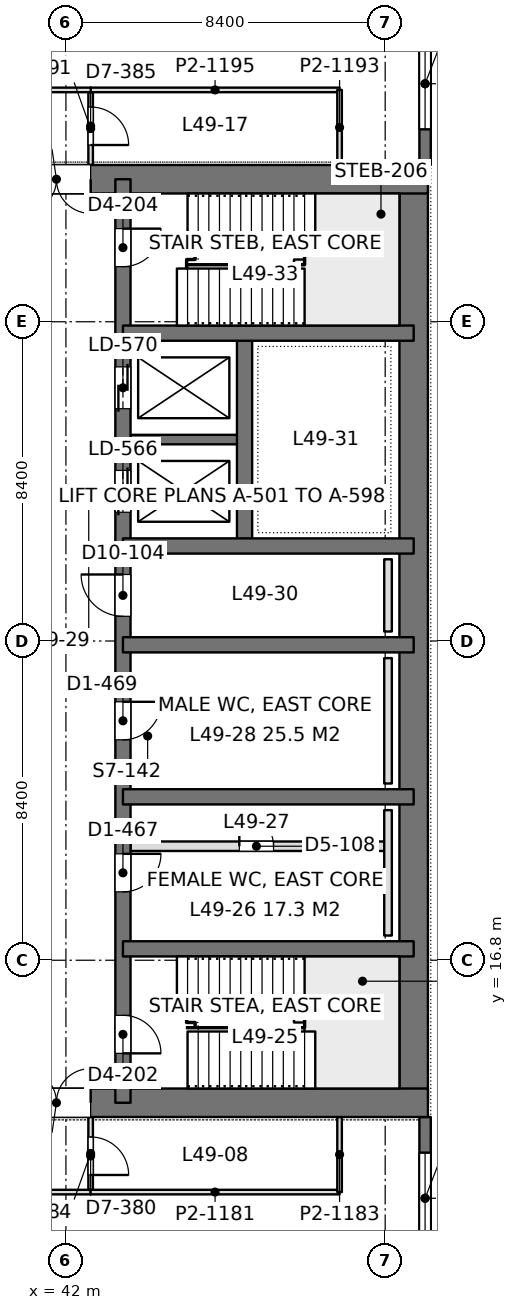
"""IFC4 building model, lengths in metres.
Left out: names, types, materials, properties, quantities, classifications, styles, units other than length and angle.
Written with IfcOpenShell. Run it as: python <this file> out.ifc"""

import sys

from ifc_helpers import new_model, si_unit, direction, frame, frame_2d, origin, place, context, subcontext, project, spatial, rectangle, extrude, element, fill, save


model = new_model("IFC4")
c1 = context("Model", 3, precision=1e-05, world=origin(), true_north=direction((0.0, 1.0)))
c2 = subcontext(c1, "Body", "Model", "MODEL_VIEW")
j1 = project(units=[si_unit("LENGTHUNIT", "METRE"), si_unit("PLANEANGLEUNIT", "RADIAN")], contexts=[c1])
p1 = place(None, origin())
s1 = spatial("IfcSite", under=j1, at=p1, CompositionType="ELEMENT")
p2 = place(p1, origin())
s2 = spatial("IfcBuilding", under=s1, at=p2, CompositionType="ELEMENT")
p3 = place(p2, frame((0.0, 0.0, 215.4)))
s3 = spatial("IfcBuildingStorey", under=s2, at=p3, CompositionType="ELEMENT", Elevation=215.4)
p4 = place(p3, frame((33.675, 13.05, 0.0), z_axis=(0.0, 0.0, 1.0), x_axis=(1.0, 0.0, 0.0)))
e1 = element("IfcWall", 1, at=p4, inside=s3, PredefinedType="SHEAR", context=c2, shape_type="SweptSolid", body=[
    extrude(rectangle(XDim=17.85, YDim=0.75, at=frame_2d((8.925, 0.0))), origin(), (0.0, 0.0, 1.0), 4.2),
])
p5 = place(p4, frame((7.175, 0.0, 0.0)))
e2 = element("IfcOpeningElement", 2, at=p5, cuts=e1, PredefinedType="OPENING", context=c2, shape_type="SweptSolid", body=[
    extrude(rectangle(XDim=1.8, YDim=2.4, at=frame_2d((0.9, 1.2))), frame((0.0, 0.385, 0.0), z_axis=(0.0, -1.0, 0.0), x_axis=(1.0, 0.0, 0.0)), (0.0, 0.0, 1.0), 0.77),
])
p6 = place(p3, frame((33.675, 37.35, 0.0), z_axis=(0.0, 0.0, 1.0), x_axis=(1.0, 0.0, 0.0)))
e3 = element("IfcWall", 3, at=p6, inside=s3, PredefinedType="SHEAR", context=c2, shape_type="SweptSolid", body=[
    extrude(rectangle(XDim=17.85, YDim=0.75, at=frame_2d((8.925, 0.0))), origin(), (0.0, 0.0, 1.0), 4.2),
])
p7 = place(p6, frame((7.175, 0.0, 0.0)))
e4 = element("IfcOpeningElement", 4, at=p7, cuts=e3, PredefinedType="OPENING", context=c2, shape_type="SweptSolid", body=[
    extrude(rectangle(XDim=1.8, YDim=2.4, at=frame_2d((0.9, 1.2))), frame((0.0, 0.385, 0.0), z_axis=(0.0, -1.0, 0.0), x_axis=(1.0, 0.0, 0.0)), (0.0, 0.0, 1.0), 0.77),
])
p8 = place(p3, frame((51.15, 13.05, 0.0), z_axis=(0.0, 0.0, 1.0), x_axis=(0.0, 1.0, 0.0)))
e5 = element("IfcWall", 5, at=p8, inside=s3, PredefinedType="SHEAR", context=c2, shape_type="SweptSolid", body=[
    extrude(rectangle(XDim=24.3, YDim=0.75, at=frame_2d((12.15, 0.0))), origin(), (0.0, 0.0, 1.0), 4.2),
])
p9 = place(p3, frame((43.5, 13.05, 0.0), z_axis=(0.0, 0.0, 1.0), x_axis=(0.0, 1.0, 0.0)))
e6 = element("IfcWall", 6, at=p9, inside=s3, PredefinedType="SHEAR", context=c2, shape_type="SweptSolid", body=[
    extrude(rectangle(XDim=24.3, YDim=0.4, at=frame_2d((12.15, 0.0))), origin(), (0.0, 0.0, 1.0), 4.2),
])
p10 = place(p9, frame((1.3, 0.0, 0.0)))
e7 = element("IfcOpeningElement", 7, at=p10, cuts=e6, PredefinedType="OPENING", context=c2, shape_type="SweptSolid", body=[
    extrude(rectangle(XDim=1.0, YDim=2.2, at=frame_2d((0.5, 1.1))), frame((0.0, 0.21, 0.0), z_axis=(0.0, -1.0, 0.0), x_axis=(1.0, 0.0, 0.0)), (0.0, 0.0, 1.0), 0.42),
])
p11 = place(p9, frame((22.0, 0.0, 0.0)))
e8 = element("IfcOpeningElement", 8, at=p11, cuts=e6, PredefinedType="OPENING", context=c2, shape_type="SweptSolid", body=[
    extrude(rectangle(XDim=1.0, YDim=2.2, at=frame_2d((0.5, 1.1))), frame((0.0, 0.21, 0.0), z_axis=(0.0, -1.0, 0.0), x_axis=(1.0, 0.0, 0.0)), (0.0, 0.0, 1.0), 0.42),
])
p12 = place(p9, frame((5.55, 0.0, 0.0)))
e9 = element("IfcOpeningElement", 9, at=p12, cuts=e6, PredefinedType="OPENING", context=c2, shape_type="SweptSolid", body=[
    extrude(rectangle(XDim=1.0, YDim=2.2, at=frame_2d((0.5, 1.1))), frame((0.0, 0.21, 0.0), z_axis=(0.0, -1.0, 0.0), x_axis=(1.0, 0.0, 0.0)), (0.0, 0.0, 1.0), 0.42),
])
p13 = place(p9, frame((9.55, 0.0, 0.0)))
e10 = element("IfcOpeningElement", 10, at=p13, cuts=e6, PredefinedType="OPENING", context=c2, shape_type="SweptSolid", body=[
    extrude(rectangle(XDim=1.0, YDim=2.2, at=frame_2d((0.5, 1.1))), frame((0.0, 0.21, 0.0), z_axis=(0.0, -1.0, 0.0), x_axis=(1.0, 0.0, 0.0)), (0.0, 0.0, 1.0), 0.42),
])
p14 = place(p9, frame((12.8, 0.0, 0.0)))
e11 = element("IfcOpeningElement", 11, at=p14, cuts=e6, PredefinedType="OPENING", context=c2, shape_type="SweptSolid", body=[
    extrude(rectangle(XDim=1.1, YDim=2.2, at=frame_2d((0.55, 1.1))), frame((0.0, 0.21, 0.0), z_axis=(0.0, -1.0, 0.0), x_axis=(1.0, 0.0, 0.0)), (0.0, 0.0, 1.0), 0.42),
])
p15 = place(p9, frame((15.538, 0.0, 0.0)))
e12 = element("IfcOpeningElement", 12, at=p15, cuts=e6, PredefinedType="OPENING", context=c2, shape_type="SweptSolid", body=[
    extrude(rectangle(XDim=1.1, YDim=2.2, at=frame_2d((0.55, 1.1))), frame((0.0, 0.21, 0.0), z_axis=(0.0, -1.0, 0.0), x_axis=(1.0, 0.0, 0.0)), (0.0, 0.0, 1.0), 0.42),
])
p16 = place(p9, frame((18.262, 0.0, 0.0)))
e13 = element("IfcOpeningElement", 13, at=p16, cuts=e6, PredefinedType="OPENING", context=c2, shape_type="SweptSolid", body=[
    extrude(rectangle(XDim=1.1, YDim=2.2, at=frame_2d((0.55, 1.1))), frame((0.0, 0.21, 0.0), z_axis=(0.0, -1.0, 0.0), x_axis=(1.0, 0.0, 0.0)), (0.0, 0.0, 1.0), 0.42),
])
for number, where, z_axis, x_axis in (
    (14, (51.15, 17.1, 0.0), (0.0, 0.0, 1.0), (-1.0, 0.0, 0.0)),
    (15, (51.15, 21.1, 0.0), (0.0, 0.0, 1.0), (-1.0, 0.0, 0.0)),
    (16, (51.15, 25.1, 0.0), (0.0, 0.0, 1.0), (-1.0, 0.0, 0.0)),
    (17, (51.15, 27.7, 0.0), (0.0, 0.0, 1.0), (-1.0, 0.0, 0.0)),
    (18, (51.15, 33.3, 0.0), (0.0, 0.0, 1.0), (-1.0, 0.0, 0.0)),
):
    element("IfcWall", number, at=place(p3, frame(where, z_axis=z_axis, x_axis=x_axis)), inside=s3, PredefinedType="SHEAR", context=c2, shape_type="SweptSolid", body=[
        extrude(rectangle(XDim=7.65, YDim=0.4, at=frame_2d((3.825, 0.0))), origin(), (0.0, 0.0, 1.0), 4.2),
    ])
p17 = place(p3, frame((46.7, 27.7, 0.0), z_axis=(0.0, 0.0, 1.0), x_axis=(0.0, 1.0, 0.0)))
e19 = element("IfcWall", 19, at=p17, inside=s3, PredefinedType="SHEAR", context=c2, shape_type="SweptSolid", body=[
    extrude(rectangle(XDim=5.6, YDim=0.4, at=frame_2d((2.8, 0.0))), origin(), (0.0, 0.0, 1.0), 4.2),
])
p18 = place(p3, frame((46.7, 30.5, 0.0), z_axis=(0.0, 0.0, 1.0), x_axis=(-1.0, 0.0, 0.0)))
e20 = element("IfcWall", 20, at=p18, inside=s3, PredefinedType="SHEAR", context=c2, shape_type="SweptSolid", body=[
    extrude(rectangle(XDim=3.2, YDim=0.25, at=frame_2d((1.6, 0.0))), origin(), (0.0, 0.0, 1.0), 4.2),
])
p19 = place(p3, frame((51.45, 42.0, 0.0), z_axis=(0.0, 0.0, 1.0), x_axis=(0.0, -1.0, 0.0)))
e21 = element("IfcWall", 21, at=p19, inside=s3, PredefinedType="SOLIDWALL", context=c2, shape_type="SweptSolid", body=[
    extrude(rectangle(XDim=4.275, YDim=0.3, at=frame_2d((2.137, 0.0))), origin(), (0.0, 0.0, 1.0), 4.05),
])
p20 = place(p19, frame((0.938, 0.0, 0.9)))
e22 = element("IfcOpeningElement", 22, at=p20, cuts=e21, PredefinedType="OPENING", context=c2, shape_type="SweptSolid", body=[
    extrude(rectangle(XDim=2.4, YDim=1.9, at=frame_2d((1.2, 0.95))), frame((0.0, 0.16, 0.0), z_axis=(0.0, -1.0, 0.0), x_axis=(1.0, 0.0, 0.0)), (0.0, 0.0, 1.0), 0.32),
])
p21 = place(p3, frame((51.45, 12.675, 0.0), z_axis=(0.0, 0.0, 1.0), x_axis=(0.0, -1.0, 0.0)))
e23 = element("IfcWall", 23, at=p21, inside=s3, PredefinedType="SOLIDWALL", context=c2, shape_type="SweptSolid", body=[
    extrude(rectangle(XDim=4.275, YDim=0.3, at=frame_2d((2.138, 0.0))), origin(), (0.0, 0.0, 1.0), 4.05),
])
p22 = place(p21, frame((0.938, 0.0, 0.9)))
e24 = element("IfcOpeningElement", 24, at=p22, cuts=e23, PredefinedType="OPENING", context=c2, shape_type="SweptSolid", body=[
    extrude(rectangle(XDim=2.4, YDim=1.9, at=frame_2d((1.2, 0.95))), frame((0.0, 0.16, 0.0), z_axis=(0.0, -1.0, 0.0), x_axis=(1.0, 0.0, 0.0)), (0.0, 0.0, 1.0), 0.32),
])
p23 = place(p3, frame((1.2, 10.7, 0.0), z_axis=(0.0, 0.0, 1.0), x_axis=(1.0, 0.0, 0.0)))
e25 = element("IfcWall", 25, at=p23, inside=s3, PredefinedType="PARTITIONING", context=c2, shape_type="SweptSolid", body=[
    extrude(rectangle(XDim=41.452, YDim=0.12, at=frame_2d((20.726, 0.0))), origin(), (0.0, 0.0, 1.0), 3.55),
])
p24 = place(p23, frame((4.3, 0.0, 0.0)))
e26 = element("IfcOpeningElement", 26, at=p24, cuts=e25, PredefinedType="OPENING", context=c2, shape_type="SweptSolid", body=[
    extrude(rectangle(XDim=1.8, YDim=2.2, at=frame_2d((0.9, 1.1))), frame((0.0, 0.07, 0.0), z_axis=(0.0, -1.0, 0.0), x_axis=(1.0, 0.0, 0.0)), (0.0, 0.0, 1.0), 0.14),
])
p25 = place(p23, frame((9.5, 0.0, 0.0)))
e27 = element("IfcOpeningElement", 27, at=p25, cuts=e25, PredefinedType="OPENING", context=c2, shape_type="SweptSolid", body=[
    extrude(rectangle(XDim=1.8, YDim=2.2, at=frame_2d((0.9, 1.1))), frame((0.0, 0.07, 0.0), z_axis=(0.0, -1.0, 0.0), x_axis=(1.0, 0.0, 0.0)), (0.0, 0.0, 1.0), 0.14),
])
p26 = place(p23, frame((23.317, 0.0, 0.0)))
e28 = element("IfcOpeningElement", 28, at=p26, cuts=e25, PredefinedType="OPENING", context=c2, shape_type="SweptSolid", body=[
    extrude(rectangle(XDim=1.8, YDim=2.2, at=frame_2d((0.9, 1.1))), frame((0.0, 0.07, 0.0), z_axis=(0.0, -1.0, 0.0), x_axis=(1.0, 0.0, 0.0)), (0.0, 0.0, 1.0), 0.14),
])
p27 = place(p23, frame((31.933, 0.0, 0.0)))
e29 = element("IfcOpeningElement", 29, at=p27, cuts=e25, PredefinedType="OPENING", context=c2, shape_type="SweptSolid", body=[
    extrude(rectangle(XDim=1.8, YDim=2.2, at=frame_2d((0.9, 1.1))), frame((0.0, 0.07, 0.0), z_axis=(0.0, -1.0, 0.0), x_axis=(1.0, 0.0, 0.0)), (0.0, 0.0, 1.0), 0.14),
])
p28 = place(p3, frame((42.65, 10.758, 0.0), z_axis=(0.0, 0.0, 1.0), x_axis=(0.0, 1.0, 0.0)))
e30 = element("IfcWall", 30, at=p28, inside=s3, PredefinedType="PARTITIONING", context=c2, shape_type="SweptSolid", body=[
    extrude(rectangle(XDim=1.918, YDim=0.12, at=frame_2d((0.959, 0.0))), origin(), (0.0, 0.0, 1.0), 4.05),
])
p29 = place(p28, frame((0.392, 0.0, 0.0)))
e31 = element("IfcOpeningElement", 31, at=p29, cuts=e30, PredefinedType="OPENING", context=c2, shape_type="SweptSolid", body=[
    extrude(rectangle(XDim=1.0, YDim=2.4, at=frame_2d((0.5, 1.2))), frame((0.0, 0.07, 0.0), z_axis=(0.0, -1.0, 0.0), x_axis=(1.0, 0.0, 0.0)), (0.0, 0.0, 1.0), 0.14),
])
p30 = place(p3, frame((42.648, 10.7, 0.0), z_axis=(0.0, 0.0, 1.0), x_axis=(1.0, 0.0, 0.0)))
e32 = element("IfcWall", 32, at=p30, inside=s3, PredefinedType="PARTITIONING", context=c2, shape_type="SweptSolid", body=[
    extrude(rectangle(XDim=6.552, YDim=0.12, at=frame_2d((3.276, 0.0))), origin(), (0.0, 0.0, 1.0), 4.05),
])
p31 = place(p3, frame((49.2, 10.7, 0.0), z_axis=(0.0, 0.0, 1.0), x_axis=(0.0, 1.0, 0.0)))
e33 = element("IfcWall", 33, at=p31, inside=s3, PredefinedType="PARTITIONING", context=c2, shape_type="SweptSolid", body=[
    extrude(rectangle(XDim=1.976, YDim=0.12, at=frame_2d((0.988, 0.0))), origin(), (0.0, 0.0, 1.0), 4.05),
])
p32 = place(p3, frame((1.2, 39.7, 0.0), z_axis=(0.0, 0.0, 1.0), x_axis=(1.0, 0.0, 0.0)))
e34 = element("IfcWall", 34, at=p32, inside=s3, PredefinedType="PARTITIONING", context=c2, shape_type="SweptSolid", body=[
    extrude(rectangle(XDim=41.452, YDim=0.12, at=frame_2d((20.726, 0.0))), origin(), (0.0, 0.0, 1.0), 3.55),
])
p33 = place(p32, frame((5.7, 0.0, 0.0)))
e35 = element("IfcOpeningElement", 35, at=p33, cuts=e34, PredefinedType="OPENING", context=c2, shape_type="SweptSolid", body=[
    extrude(rectangle(XDim=1.8, YDim=2.2, at=frame_2d((0.9, 1.1))), frame((0.0, 0.07, 0.0), z_axis=(0.0, -1.0, 0.0), x_axis=(1.0, 0.0, 0.0)), (0.0, 0.0, 1.0), 0.14),
])
p34 = place(p32, frame((12.3, 0.0, 0.0)))
e36 = element("IfcOpeningElement", 36, at=p34, cuts=e34, PredefinedType="OPENING", context=c2, shape_type="SweptSolid", body=[
    extrude(rectangle(XDim=1.8, YDim=2.2, at=frame_2d((0.9, 1.1))), frame((0.0, 0.07, 0.0), z_axis=(0.0, -1.0, 0.0), x_axis=(1.0, 0.0, 0.0)), (0.0, 0.0, 1.0), 0.14),
])
p35 = place(p32, frame((26.117, 0.0, 0.0)))
e37 = element("IfcOpeningElement", 37, at=p35, cuts=e34, PredefinedType="OPENING", context=c2, shape_type="SweptSolid", body=[
    extrude(rectangle(XDim=1.8, YDim=2.2, at=frame_2d((0.9, 1.1))), frame((0.0, 0.07, 0.0), z_axis=(0.0, -1.0, 0.0), x_axis=(1.0, 0.0, 0.0)), (0.0, 0.0, 1.0), 0.14),
])
p36 = place(p32, frame((33.333, 0.0, 0.0)))
e38 = element("IfcOpeningElement", 38, at=p36, cuts=e34, PredefinedType="OPENING", context=c2, shape_type="SweptSolid", body=[
    extrude(rectangle(XDim=1.8, YDim=2.2, at=frame_2d((0.9, 1.1))), frame((0.0, 0.07, 0.0), z_axis=(0.0, -1.0, 0.0), x_axis=(1.0, 0.0, 0.0)), (0.0, 0.0, 1.0), 0.14),
])
p37 = place(p3, frame((42.65, 37.724, 0.0), z_axis=(0.0, 0.0, 1.0), x_axis=(0.0, 1.0, 0.0)))
e39 = element("IfcWall", 39, at=p37, inside=s3, PredefinedType="PARTITIONING", context=c2, shape_type="SweptSolid", body=[
    extrude(rectangle(XDim=1.918, YDim=0.12, at=frame_2d((0.959, 0.0))), origin(), (0.0, 0.0, 1.0), 4.05),
])
p38 = place(p37, frame((0.526, 0.0, 0.0)))
e40 = element("IfcOpeningElement", 40, at=p38, cuts=e39, PredefinedType="OPENING", context=c2, shape_type="SweptSolid", body=[
    extrude(rectangle(XDim=1.0, YDim=2.4, at=frame_2d((0.5, 1.2))), frame((0.0, 0.07, 0.0), z_axis=(0.0, -1.0, 0.0), x_axis=(1.0, 0.0, 0.0)), (0.0, 0.0, 1.0), 0.14),
])
p39 = place(p3, frame((42.648, 39.7, 0.0), z_axis=(0.0, 0.0, 1.0), x_axis=(1.0, 0.0, 0.0)))
e41 = element("IfcWall", 41, at=p39, inside=s3, PredefinedType="PARTITIONING", context=c2, shape_type="SweptSolid", body=[
    extrude(rectangle(XDim=6.552, YDim=0.12, at=frame_2d((3.276, 0.0))), origin(), (0.0, 0.0, 1.0), 3.69),
])
p40 = place(p3, frame((49.2, 37.724, 0.0), z_axis=(0.0, 0.0, 1.0), x_axis=(0.0, 1.0, 0.0)))
e42 = element("IfcWall", 42, at=p40, inside=s3, PredefinedType="PARTITIONING", context=c2, shape_type="SweptSolid", body=[
    extrude(rectangle(XDim=1.976, YDim=0.12, at=frame_2d((0.988, 0.0))), origin(), (0.0, 0.0, 1.0), 4.05),
])
p41 = place(p3, frame((43.7, 19.8, 0.0), z_axis=(0.0, 0.0, 1.0), x_axis=(1.0, 0.0, 0.0)))
e43 = element("IfcWall", 43, at=p41, inside=s3, PredefinedType="PARTITIONING", context=c2, shape_type="SweptSolid", body=[
    extrude(rectangle(XDim=6.675, YDim=0.25, at=frame_2d((3.337, 0.0))), origin(), (0.0, 0.0, 1.0), 4.0),
])
p42 = place(p41, frame((2.863, 0.0, 0.0)))
e44 = element("IfcOpeningElement", 44, at=p42, cuts=e43, PredefinedType="OPENING", context=c2, shape_type="SweptSolid", body=[
    extrude(rectangle(XDim=0.9, YDim=2.2, at=frame_2d((0.45, 1.1))), frame((0.0, 0.135, 0.0), z_axis=(0.0, -1.0, 0.0), x_axis=(1.0, 0.0, 0.0)), (0.0, 0.0, 1.0), 0.27),
])
for number, where, z_axis, x_axis in (
    (45, (50.475, 17.45, 0.0), (0.0, 0.0, 1.0), (0.0, 1.0, 0.0)),
    (46, (50.475, 21.45, 0.0), (0.0, 0.0, 1.0), (0.0, 1.0, 0.0)),
):
    element("IfcWall", number, at=place(p3, frame(where, z_axis=z_axis, x_axis=x_axis)), inside=s3, PredefinedType="PLUMBINGWALL", context=c2, shape_type="SweptSolid", body=[
        extrude(rectangle(XDim=3.3, YDim=0.2, at=frame_2d((1.65, 0.0))), origin(), (0.0, 0.0, 1.0), 1.2),
    ])
p43 = place(p3, frame((50.475, 25.45, 0.0), z_axis=(0.0, 0.0, 1.0), x_axis=(0.0, 1.0, 0.0)))
e47 = element("IfcWall", 47, at=p43, inside=s3, PredefinedType="PLUMBINGWALL", context=c2, shape_type="SweptSolid", body=[
    extrude(rectangle(XDim=1.9, YDim=0.2, at=frame_2d((0.95, 0.0))), origin(), (0.0, 0.0, 1.0), 1.2),
])
p44 = place(p20, origin())
e48 = element("IfcWindow", 48, at=p44, inside=s3, PartitioningType="SINGLE_PANEL", PredefinedType="WINDOW", context=c2, shape_type="SweptSolid", body=[
    extrude(rectangle(XDim=2.4, YDim=1.9, at=frame_2d((1.2, 0.95))), frame((0.0, 0.03, 0.0), z_axis=(0.0, -1.0, 0.0), x_axis=(1.0, 0.0, 0.0)), (0.0, 0.0, 1.0), 0.06),
])
fill(e22, e48)
p45 = place(p22, origin())
e49 = element("IfcWindow", 49, at=p45, inside=s3, PartitioningType="SINGLE_PANEL", PredefinedType="WINDOW", context=c2, shape_type="SweptSolid", body=[
    extrude(rectangle(XDim=2.4, YDim=1.9, at=frame_2d((1.2, 0.95))), frame((0.0, 0.03, 0.0), z_axis=(0.0, -1.0, 0.0), x_axis=(1.0, 0.0, 0.0)), (0.0, 0.0, 1.0), 0.06),
])
fill(e24, e49)
p46 = place(p5, origin())
e50 = element("IfcDoor", 50, at=p46, inside=s3, OperationType="DOUBLE_DOOR_SINGLE_SWING", PredefinedType="DOOR", context=c2, shape_type="SweptSolid", body=[
    extrude(rectangle(XDim=1.8, YDim=2.4, at=frame_2d((0.9, 1.2))), frame((0.0, 0.025, 0.0), z_axis=(0.0, -1.0, 0.0), x_axis=(1.0, 0.0, 0.0)), (0.0, 0.0, 1.0), 0.05),
])
fill(e2, e50)
p47 = place(p7, frame((1.8, 0.0, 0.0), z_axis=(0.0, 0.0, 1.0), x_axis=(-1.0, 0.0, 0.0)))
e51 = element("IfcDoor", 51, at=p47, inside=s3, OperationType="DOUBLE_DOOR_SINGLE_SWING", PredefinedType="DOOR", context=c2, shape_type="SweptSolid", body=[
    extrude(rectangle(XDim=1.8, YDim=2.4, at=frame_2d((0.9, 1.2))), frame((0.0, 0.025, 0.0), z_axis=(0.0, -1.0, 0.0), x_axis=(1.0, 0.0, 0.0)), (0.0, 0.0, 1.0), 0.05),
])
fill(e4, e51)
p48 = place(p10, frame((1.0, 0.0, 0.0), z_axis=(0.0, 0.0, 1.0), x_axis=(-1.0, 0.0, 0.0)))
e52 = element("IfcDoor", 52, at=p48, inside=s3, OperationType="SINGLE_SWING_RIGHT", PredefinedType="DOOR", context=c2, shape_type="SweptSolid", body=[
    extrude(rectangle(XDim=1.0, YDim=2.2, at=frame_2d((0.5, 1.1))), frame((0.0, 0.025, 0.0), z_axis=(0.0, -1.0, 0.0), x_axis=(1.0, 0.0, 0.0)), (0.0, 0.0, 1.0), 0.05),
])
fill(e7, e52)
p49 = place(p11, frame((1.0, 0.0, 0.0), z_axis=(0.0, 0.0, 1.0), x_axis=(-1.0, 0.0, 0.0)))
e53 = element("IfcDoor", 53, at=p49, inside=s3, OperationType="SINGLE_SWING_LEFT", PredefinedType="DOOR", context=c2, shape_type="SweptSolid", body=[
    extrude(rectangle(XDim=1.0, YDim=2.2, at=frame_2d((0.5, 1.1))), frame((0.0, 0.025, 0.0), z_axis=(0.0, -1.0, 0.0), x_axis=(1.0, 0.0, 0.0)), (0.0, 0.0, 1.0), 0.05),
])
fill(e8, e53)
p50 = place(p12, frame((1.0, 0.0, 0.0), z_axis=(0.0, 0.0, 1.0), x_axis=(-1.0, 0.0, 0.0)))
e54 = element("IfcDoor", 54, at=p50, inside=s3, OperationType="SINGLE_SWING_LEFT", PredefinedType="DOOR", context=c2, shape_type="SweptSolid", body=[
    extrude(rectangle(XDim=1.0, YDim=2.2, at=frame_2d((0.5, 1.1))), frame((0.0, 0.025, 0.0), z_axis=(0.0, -1.0, 0.0), x_axis=(1.0, 0.0, 0.0)), (0.0, 0.0, 1.0), 0.05),
])
fill(e9, e54)
p51 = place(p13, frame((1.0, 0.0, 0.0), z_axis=(0.0, 0.0, 1.0), x_axis=(-1.0, 0.0, 0.0)))
e55 = element("IfcDoor", 55, at=p51, inside=s3, OperationType="SINGLE_SWING_LEFT", PredefinedType="DOOR", context=c2, shape_type="SweptSolid", body=[
    extrude(rectangle(XDim=1.0, YDim=2.2, at=frame_2d((0.5, 1.1))), frame((0.0, 0.025, 0.0), z_axis=(0.0, -1.0, 0.0), x_axis=(1.0, 0.0, 0.0)), (0.0, 0.0, 1.0), 0.05),
])
fill(e10, e55)
p52 = place(p14, origin())
e56 = element("IfcDoor", 56, at=p52, inside=s3, OperationType="SINGLE_SWING_RIGHT", PredefinedType="DOOR", context=c2, shape_type="SweptSolid", body=[
    extrude(rectangle(XDim=1.1, YDim=2.2, at=frame_2d((0.55, 1.1))), frame((0.0, 0.025, 0.0), z_axis=(0.0, -1.0, 0.0), x_axis=(1.0, 0.0, 0.0)), (0.0, 0.0, 1.0), 0.05),
])
fill(e11, e56)
p53 = place(p15, origin())
e57 = element("IfcDoor", 57, at=p53, inside=s3, OperationType="DOUBLE_DOOR_SLIDING", PredefinedType="DOOR", context=c2, shape_type="SweptSolid", body=[
    extrude(rectangle(XDim=1.1, YDim=2.2, at=frame_2d((0.55, 1.1))), frame((0.0, 0.025, 0.0), z_axis=(0.0, -1.0, 0.0), x_axis=(1.0, 0.0, 0.0)), (0.0, 0.0, 1.0), 0.05),
])
fill(e12, e57)
p54 = place(p16, origin())
e58 = element("IfcDoor", 58, at=p54, inside=s3, OperationType="DOUBLE_DOOR_SLIDING", PredefinedType="DOOR", context=c2, shape_type="SweptSolid", body=[
    extrude(rectangle(XDim=1.1, YDim=2.2, at=frame_2d((0.55, 1.1))), frame((0.0, 0.025, 0.0), z_axis=(0.0, -1.0, 0.0), x_axis=(1.0, 0.0, 0.0)), (0.0, 0.0, 1.0), 0.05),
])
fill(e13, e58)
p55 = place(p29, frame((1.0, 0.0, 0.0), z_axis=(0.0, 0.0, 1.0), x_axis=(-1.0, 0.0, 0.0)))
e59 = element("IfcDoor", 59, at=p55, inside=s3, OperationType="SINGLE_SWING_RIGHT", PredefinedType="DOOR", context=c2, shape_type="SweptSolid", body=[
    extrude(rectangle(XDim=1.0, YDim=2.4, at=frame_2d((0.5, 1.2))), frame((0.0, 0.025, 0.0), z_axis=(0.0, -1.0, 0.0), x_axis=(1.0, 0.0, 0.0)), (0.0, 0.0, 1.0), 0.05),
])
fill(e31, e59)
p56 = place(p38, frame((1.0, 0.0, 0.0), z_axis=(0.0, 0.0, 1.0), x_axis=(-1.0, 0.0, 0.0)))
e60 = element("IfcDoor", 60, at=p56, inside=s3, OperationType="SINGLE_SWING_RIGHT", PredefinedType="DOOR", context=c2, shape_type="SweptSolid", body=[
    extrude(rectangle(XDim=1.0, YDim=2.4, at=frame_2d((0.5, 1.2))), frame((0.0, 0.025, 0.0), z_axis=(0.0, -1.0, 0.0), x_axis=(1.0, 0.0, 0.0)), (0.0, 0.0, 1.0), 0.05),
])
fill(e40, e60)
p57 = place(p42, origin())
e61 = element("IfcDoor", 61, at=p57, inside=s3, OperationType="SINGLE_SWING_LEFT", PredefinedType="DOOR", context=c2, shape_type="SweptSolid", body=[
    extrude(rectangle(XDim=0.9, YDim=2.2, at=frame_2d((0.45, 1.1))), frame((0.0, 0.025, 0.0), z_axis=(0.0, -1.0, 0.0), x_axis=(1.0, 0.0, 0.0)), (0.0, 0.0, 1.0), 0.05),
])
fill(e44, e61)
save(model, sys.argv[1])
